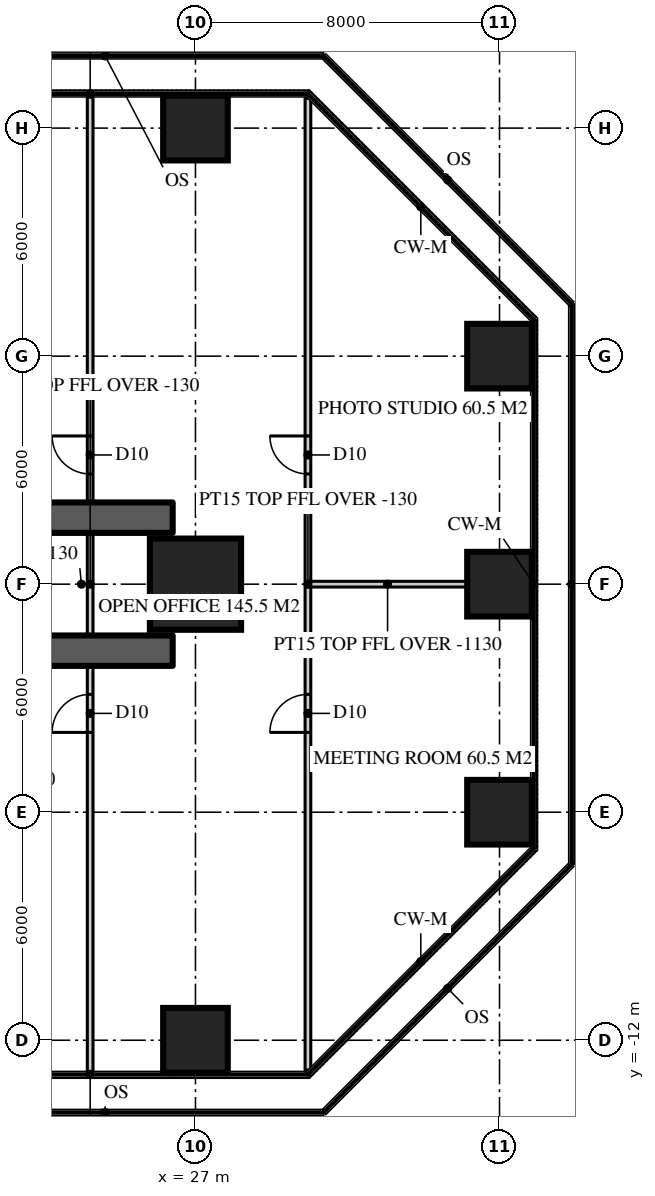
"""IFC4 building model, lengths in metres.
Left out: names, types, materials, properties, quantities, classifications, styles, units other than length and angle.
Written with IfcOpenShell. Run it as: python <this file> out.ifc"""

import sys

from ifc_helpers import new_model, si_unit, direction, frame, frame_2d, origin, origin_2d, place, context, subcontext, project, spatial, rectangle, extrude, element, fill, save


model = new_model("IFC4")
c1 = context("Model", 3, precision=1e-05, world=origin(), true_north=direction((0.0, 1.0)))
c2 = subcontext(c1, "Body", "Model", "MODEL_VIEW")
j1 = project(units=[si_unit("LENGTHUNIT", "METRE"), si_unit("PLANEANGLEUNIT", "RADIAN")], contexts=[c1])
p1 = place(None, origin())
s1 = spatial("IfcSite", under=j1, at=p1, CompositionType="ELEMENT")
p2 = place(p1, origin())
s2 = spatial("IfcBuilding", under=s1, at=p2, CompositionType="ELEMENT")
p3 = place(p2, frame((0.0, 0.0, 186.6)))
s3 = spatial("IfcBuildingStorey", under=s2, at=p3, CompositionType="ELEMENT", Elevation=186.6)
for number, where, z_axis, x_axis in (
    (1, (11.15, -1.75, 0.0), (0.0, 0.0, 1.0), (1.0, 0.0, 0.0)),
    (2, (11.15, 1.75, 0.0), (0.0, 0.0, 1.0), (1.0, 0.0, 0.0)),
):
    element("IfcWall", number, at=place(p3, frame(where, z_axis=z_axis, x_axis=x_axis)), inside=s3, PredefinedType="SHEAR", context=c2, shape_type="SweptSolid", body=[
        extrude(rectangle(XDim=15.25, YDim=0.8, at=frame_2d((7.625, 0.0))), origin(), (0.0, 0.0, 1.0), 3.9),
    ])
for number, where, z_axis, x_axis in (
    (3, (27.0, -12.0, 0.0), (0.0, 0.0, 1.0), (1.0, 0.0, 0.0)),
    (4, (35.0, -6.0, 0.0), (0.0, 0.0, 1.0), (1.0, 0.0, 0.0)),
):
    element("IfcColumn", number, at=place(p3, frame(where, z_axis=z_axis, x_axis=x_axis)), inside=s3, PredefinedType="COLUMN", context=c2, shape_type="SweptSolid", body=[
        extrude(rectangle(XDim=1.7, YDim=1.7, at=origin_2d()), origin(), (0.0, 0.0, 1.0), 3.9),
    ])
p4 = place(p3, frame((27.0, 0.0, 0.0), z_axis=(0.0, 0.0, 1.0), x_axis=(1.0, 0.0, 0.0)))
e5 = element("IfcColumn", 5, at=p4, inside=s3, PredefinedType="COLUMN", context=c2, shape_type="SweptSolid", body=[
    extrude(rectangle(XDim=2.4, YDim=2.4, at=origin_2d()), origin(), (0.0, 0.0, 1.0), 3.9),
])
for number, where, z_axis, x_axis in (
    (6, (35.0, 0.0, 0.0), (0.0, 0.0, 1.0), (1.0, 0.0, 0.0)),
    (7, (35.0, 6.0, 0.0), (0.0, 0.0, 1.0), (1.0, 0.0, 0.0)),
    (8, (27.0, 12.0, 0.0), (0.0, 0.0, 1.0), (1.0, 0.0, 0.0)),
):
    element("IfcColumn", number, at=place(p3, frame(where, z_axis=z_axis, x_axis=x_axis)), inside=s3, PredefinedType="COLUMN", context=c2, shape_type="SweptSolid", body=[
        extrude(rectangle(XDim=1.7, YDim=1.7, at=origin_2d()), origin(), (0.0, 0.0, 1.0), 3.9),
    ])
p5 = place(p3, frame((24.229, -12.82, 0.0), z_axis=(0.0, 0.0, 1.0), x_axis=(0.0, 1.0, 0.0)))
e9 = element("IfcWall", 9, at=p5, inside=s3, PredefinedType="PARTITIONING", context=c2, shape_type="SweptSolid", body=[
    extrude(rectangle(XDim=25.64, YDim=0.15, at=frame_2d((12.82, 0.0))), origin(), (0.0, 0.0, 1.0), 3.77),
])
p6 = place(p5, frame((15.72, 0.0, 0.0)))
e10 = element("IfcOpeningElement", 10, at=p6, cuts=e9, PredefinedType="OPENING", context=c2, shape_type="SweptSolid", body=[
    extrude(rectangle(XDim=1.0, YDim=2.2, at=frame_2d((0.5, 1.1))), frame((0.0, 0.085, 0.0), z_axis=(0.0, -1.0, 0.0), x_axis=(1.0, 0.0, 0.0)), (0.0, 0.0, 1.0), 0.17),
])
p7 = place(p5, frame((8.92, 0.0, 0.0)))
e11 = element("IfcOpeningElement", 11, at=p7, cuts=e9, PredefinedType="OPENING", context=c2, shape_type="SweptSolid", body=[
    extrude(rectangle(XDim=1.0, YDim=2.2, at=frame_2d((0.5, 1.1))), frame((0.0, 0.085, 0.0), z_axis=(0.0, -1.0, 0.0), x_axis=(1.0, 0.0, 0.0)), (0.0, 0.0, 1.0), 0.17),
])
p8 = place(p3, frame((29.959, -12.786, 0.0), z_axis=(0.0, 0.0, 1.0), x_axis=(0.0, 1.0, 0.0)))
e12 = element("IfcWall", 12, at=p8, inside=s3, PredefinedType="PARTITIONING", context=c2, shape_type="SweptSolid", body=[
    extrude(rectangle(XDim=25.573, YDim=0.15, at=frame_2d((12.786, 0.0))), origin(), (0.0, 0.0, 1.0), 3.77),
])
p9 = place(p8, frame((15.687, 0.0, 0.0)))
e13 = element("IfcOpeningElement", 13, at=p9, cuts=e12, PredefinedType="OPENING", context=c2, shape_type="SweptSolid", body=[
    extrude(rectangle(XDim=1.0, YDim=2.2, at=frame_2d((0.5, 1.1))), frame((0.0, 0.085, 0.0), z_axis=(0.0, -1.0, 0.0), x_axis=(1.0, 0.0, 0.0)), (0.0, 0.0, 1.0), 0.17),
])
p10 = place(p8, frame((8.886, 0.0, 0.0)))
e14 = element("IfcOpeningElement", 14, at=p10, cuts=e12, PredefinedType="OPENING", context=c2, shape_type="SweptSolid", body=[
    extrude(rectangle(XDim=1.0, YDim=2.2, at=frame_2d((0.5, 1.1))), frame((0.0, 0.085, 0.0), z_axis=(0.0, -1.0, 0.0), x_axis=(1.0, 0.0, 0.0)), (0.0, 0.0, 1.0), 0.17),
])
p11 = place(p3, frame((29.959, 0.0, 0.0), z_axis=(0.0, 0.0, 1.0), x_axis=(1.0, 0.0, 0.0)))
e15 = element("IfcWall", 15, at=p11, inside=s3, PredefinedType="PARTITIONING", context=c2, shape_type="SweptSolid", body=[
    extrude(rectangle(XDim=4.191, YDim=0.15, at=frame_2d((2.095, 0.0))), origin(), (0.0, 0.0, 1.0), 2.77),
])
p12 = place(p6, origin())
e16 = element("IfcDoor", 16, at=p12, inside=s3, OperationType="SINGLE_SWING_RIGHT", PredefinedType="DOOR", context=c2, shape_type="SweptSolid", body=[
    extrude(rectangle(XDim=1.0, YDim=2.2, at=frame_2d((0.5, 1.1))), frame((0.0, 0.025, 0.0), z_axis=(0.0, -1.0, 0.0), x_axis=(1.0, 0.0, 0.0)), (0.0, 0.0, 1.0), 0.05),
])
fill(e10, e16)
p13 = place(p7, origin())
e17 = element("IfcDoor", 17, at=p13, inside=s3, OperationType="SINGLE_SWING_LEFT", PredefinedType="DOOR", context=c2, shape_type="SweptSolid", body=[
    extrude(rectangle(XDim=1.0, YDim=2.2, at=frame_2d((0.5, 1.1))), frame((0.0, 0.025, 0.0), z_axis=(0.0, -1.0, 0.0), x_axis=(1.0, 0.0, 0.0)), (0.0, 0.0, 1.0), 0.05),
])
fill(e11, e17)
p14 = place(p9, origin())
e18 = element("IfcDoor", 18, at=p14, inside=s3, OperationType="SINGLE_SWING_RIGHT", PredefinedType="DOOR", context=c2, shape_type="SweptSolid", body=[
    extrude(rectangle(XDim=1.0, YDim=2.2, at=frame_2d((0.5, 1.1))), frame((0.0, 0.025, 0.0), z_axis=(0.0, -1.0, 0.0), x_axis=(1.0, 0.0, 0.0)), (0.0, 0.0, 1.0), 0.05),
])
fill(e13, e18)
p15 = place(p10, origin())
e19 = element("IfcDoor", 19, at=p15, inside=s3, OperationType="SINGLE_SWING_LEFT", PredefinedType="DOOR", context=c2, shape_type="SweptSolid", body=[
    extrude(rectangle(XDim=1.0, YDim=2.2, at=frame_2d((0.5, 1.1))), frame((0.0, 0.025, 0.0), z_axis=(0.0, -1.0, 0.0), x_axis=(1.0, 0.0, 0.0)), (0.0, 0.0, 1.0), 0.05),
])
fill(e14, e19)
save(model, sys.argv[1])
